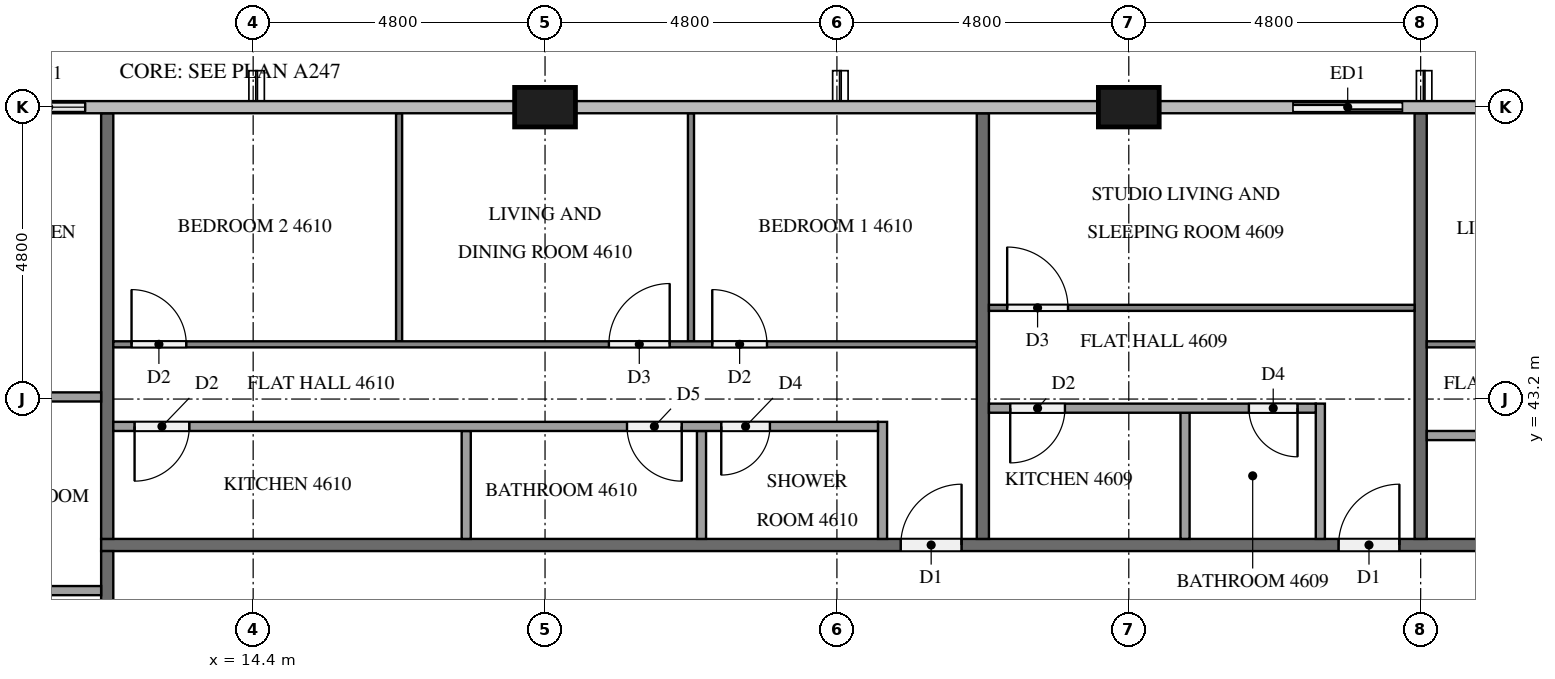
"""IFC4 building model, lengths in metres.
Left out: names, types, materials, properties, quantities, classifications, styles, units other than length and angle.
Written with IfcOpenShell. Run it as: python <this file> out.ifc"""

import sys

from ifc_helpers import new_model, si_unit, direction, frame, frame_2d, origin, origin_2d, place, context, subcontext, project, spatial, rectangle, extrude, element, fill, save


model = new_model("IFC4")
c1 = context("Model", 3, precision=1e-05, world=origin(), true_north=direction((0.0, 1.0)))
c2 = subcontext(c1, "Body", "Model", "MODEL_VIEW")
j1 = project(units=[si_unit("LENGTHUNIT", "METRE"), si_unit("PLANEANGLEUNIT", "RADIAN")], contexts=[c1])
p1 = place(None, origin())
s1 = spatial("IfcSite", under=j1, at=p1, CompositionType="ELEMENT")
p2 = place(p1, origin())
s2 = spatial("IfcBuilding", under=s1, at=p2, CompositionType="ELEMENT")
p3 = place(p2, frame((0.0, 0.0, 178.9)))
s3 = spatial("IfcBuildingStorey", under=s2, at=p3, CompositionType="ELEMENT", Elevation=178.9)
for number, where, z_axis, x_axis in (
    (1, (28.8, 48.0, 0.0), (0.0, 0.0, 1.0), (1.0, 0.0, 0.0)),
    (2, (19.2, 48.0, 0.0), (0.0, 0.0, 1.0), (1.0, 0.0, 0.0)),
):
    element("IfcColumn", number, at=place(p3, frame(where, z_axis=z_axis, x_axis=x_axis)), inside=s3, PredefinedType="COLUMN", context=c2, shape_type="SweptSolid", body=[
        extrude(rectangle(XDim=1.0, YDim=0.65, at=origin_2d()), origin(), (0.0, 0.0, 1.0), 3.2),
    ])
p4 = place(p3, frame((33.6, 48.0, 0.0), z_axis=(0.0, 0.0, 1.0), x_axis=(-1.0, 0.0, 0.0)))
e3 = element("IfcWall", 3, at=p4, inside=s3, PredefinedType="SOLIDWALL", context=c2, shape_type="SweptSolid", body=[
    extrude(rectangle(XDim=2.4, YDim=0.15, at=frame_2d((1.2, 0.0))), origin(), (0.0, 0.0, 1.0), 3.2),
])
p5 = place(p4, frame((0.3, 0.0, 0.0)))
e4 = element("IfcOpeningElement", 4, at=p5, cuts=e3, PredefinedType="OPENING", context=c2, shape_type="SweptSolid", body=[
    extrude(rectangle(XDim=1.8, YDim=2.4, at=frame_2d((0.9, 1.2))), frame((0.0, 0.085, 0.0), z_axis=(0.0, -1.0, 0.0), x_axis=(1.0, 0.0, 0.0)), (0.0, 0.0, 1.0), 0.17),
])
p6 = place(p3, frame((12.0, 48.0, 0.0), z_axis=(0.0, 0.0, 1.0), x_axis=(-1.0, 0.0, 0.0)))
e5 = element("IfcWall", 5, at=p6, inside=s3, PredefinedType="SOLIDWALL", context=c2, shape_type="SweptSolid", body=[
    extrude(rectangle(XDim=1.925, YDim=0.15, at=frame_2d((0.962, 0.0))), origin(), (0.0, 0.0, 1.0), 3.2),
])
p7 = place(p6, frame((0.363, 0.0, 0.9)))
e6 = element("IfcOpeningElement", 6, at=p7, cuts=e5, PredefinedType="OPENING", context=c2, shape_type="SweptSolid", body=[
    extrude(rectangle(XDim=1.2, YDim=1.4, at=frame_2d((0.6, 0.7))), frame((0.0, 0.085, 0.0), z_axis=(0.0, -1.0, 0.0), x_axis=(1.0, 0.0, 0.0)), (0.0, 0.0, 1.0), 0.17),
])
p8 = place(p3, frame((11.9, 40.8, 0.0), z_axis=(0.0, 0.0, 1.0), x_axis=(1.0, 0.0, 0.0)))
e7 = element("IfcWall", 7, at=p8, inside=s3, PredefinedType="PARTITIONING", context=c2, shape_type="SweptSolid", body=[
    extrude(rectangle(XDim=38.6, YDim=0.2, at=frame_2d((19.3, 0.0))), origin(), (0.0, 0.0, 1.0), 3.2),
])
p9 = place(p8, frame((37.15, 0.0, 0.0)))
e8 = element("IfcOpeningElement", 8, at=p9, cuts=e7, PredefinedType="OPENING", context=c2, shape_type="SweptSolid", body=[
    extrude(rectangle(XDim=1.0, YDim=2.1, at=frame_2d((0.5, 1.05))), frame((0.0, 0.11, 0.0), z_axis=(0.0, -1.0, 0.0), x_axis=(1.0, 0.0, 0.0)), (0.0, 0.0, 1.0), 0.22),
])
p10 = place(p8, frame((20.35, 0.0, 0.0)))
e9 = element("IfcOpeningElement", 9, at=p10, cuts=e7, PredefinedType="OPENING", context=c2, shape_type="SweptSolid", body=[
    extrude(rectangle(XDim=1.0, YDim=2.1, at=frame_2d((0.5, 1.05))), frame((0.0, 0.11, 0.0), z_axis=(0.0, -1.0, 0.0), x_axis=(1.0, 0.0, 0.0)), (0.0, 0.0, 1.0), 0.22),
])
p11 = place(p8, frame((13.15, 0.0, 0.0)))
e10 = element("IfcOpeningElement", 10, at=p11, cuts=e7, PredefinedType="OPENING", context=c2, shape_type="SweptSolid", body=[
    extrude(rectangle(XDim=1.0, YDim=2.1, at=frame_2d((0.5, 1.05))), frame((0.0, 0.11, 0.0), z_axis=(0.0, -1.0, 0.0), x_axis=(1.0, 0.0, 0.0)), (0.0, 0.0, 1.0), 0.22),
])
p12 = place(p3, frame((12.0, 12.1, 0.0), z_axis=(0.0, 0.0, 1.0), x_axis=(0.0, 1.0, 0.0)))
e11 = element("IfcWall", 11, at=p12, inside=s3, PredefinedType="PARTITIONING", context=c2, shape_type="SweptSolid", body=[
    extrude(rectangle(XDim=28.6, YDim=0.2, at=frame_2d((14.3, 0.0))), origin(), (0.0, 0.0, 1.0), 3.2),
])
p13 = place(p12, frame((26.65, 0.0, 0.0)))
e12 = element("IfcOpeningElement", 12, at=p13, cuts=e11, PredefinedType="OPENING", context=c2, shape_type="SweptSolid", body=[
    extrude(rectangle(XDim=1.0, YDim=2.1, at=frame_2d((0.5, 1.05))), frame((0.0, 0.11, 0.0), z_axis=(0.0, -1.0, 0.0), x_axis=(1.0, 0.0, 0.0)), (0.0, 0.0, 1.0), 0.22),
])
p14 = place(p12, frame((24.95, 0.0, 0.0)))
e13 = element("IfcOpeningElement", 13, at=p14, cuts=e11, PredefinedType="OPENING", context=c2, shape_type="SweptSolid", body=[
    extrude(rectangle(XDim=1.0, YDim=2.1, at=frame_2d((0.5, 1.05))), frame((0.0, 0.11, 0.0), z_axis=(0.0, -1.0, 0.0), x_axis=(1.0, 0.0, 0.0)), (0.0, 0.0, 1.0), 0.22),
])
p15 = place(p12, frame((12.95, 0.0, 0.0)))
e14 = element("IfcOpeningElement", 14, at=p15, cuts=e11, PredefinedType="OPENING", context=c2, shape_type="SweptSolid", body=[
    extrude(rectangle(XDim=1.0, YDim=2.1, at=frame_2d((0.5, 1.05))), frame((0.0, 0.11, 0.0), z_axis=(0.0, -1.0, 0.0), x_axis=(1.0, 0.0, 0.0)), (0.0, 0.0, 1.0), 0.22),
])
for number, where, z_axis, x_axis in (
    (15, (33.6, 47.9, 0.0), (0.0, 0.0, 1.0), (0.0, -1.0, 0.0)),
    (16, (26.4, 47.9, 0.0), (0.0, 0.0, 1.0), (0.0, -1.0, 0.0)),
    (17, (12.0, 47.9, 0.0), (0.0, 0.0, 1.0), (0.0, -1.0, 0.0)),
):
    element("IfcWall", number, at=place(p3, frame(where, z_axis=z_axis, x_axis=x_axis)), inside=s3, PredefinedType="PARTITIONING", context=c2, shape_type="SweptSolid", body=[
        extrude(rectangle(XDim=7.0, YDim=0.2, at=frame_2d((3.5, 0.0))), origin(), (0.0, 0.0, 1.0), 3.2),
    ])
p16 = place(p3, frame((33.7, 44.1, 0.0), z_axis=(0.0, 0.0, 1.0), x_axis=(1.0, 0.0, 0.0)))
e18 = element("IfcWall", 18, at=p16, inside=s3, PredefinedType="PARTITIONING", context=c2, shape_type="SweptSolid", body=[
    extrude(rectangle(XDim=16.6, YDim=0.1, at=frame_2d((8.3, 0.0))), origin(), (0.0, 0.0, 1.0), 3.2),
])
p17 = place(p16, frame((15.4, 0.0, 0.0)))
e19 = element("IfcOpeningElement", 19, at=p17, cuts=e18, PredefinedType="OPENING", context=c2, shape_type="SweptSolid", body=[
    extrude(rectangle(XDim=0.9, YDim=2.1, at=frame_2d((0.45, 1.05))), frame((0.0, 0.06, 0.0), z_axis=(0.0, -1.0, 0.0), x_axis=(1.0, 0.0, 0.0)), (0.0, 0.0, 1.0), 0.12),
])
p18 = place(p16, frame((7.45, 0.0, 0.0)))
e20 = element("IfcOpeningElement", 20, at=p18, cuts=e18, PredefinedType="OPENING", context=c2, shape_type="SweptSolid", body=[
    extrude(rectangle(XDim=0.9, YDim=2.1, at=frame_2d((0.45, 1.05))), frame((0.0, 0.06, 0.0), z_axis=(0.0, -1.0, 0.0), x_axis=(1.0, 0.0, 0.0)), (0.0, 0.0, 1.0), 0.12),
])
p19 = place(p16, frame((5.75, 0.0, 0.0)))
e21 = element("IfcOpeningElement", 21, at=p19, cuts=e18, PredefinedType="OPENING", context=c2, shape_type="SweptSolid", body=[
    extrude(rectangle(XDim=1.0, YDim=2.1, at=frame_2d((0.5, 1.05))), frame((0.0, 0.06, 0.0), z_axis=(0.0, -1.0, 0.0), x_axis=(1.0, 0.0, 0.0)), (0.0, 0.0, 1.0), 0.12),
])
p20 = place(p3, frame((48.675, 42.6, 0.0), z_axis=(0.0, 0.0, 1.0), x_axis=(-1.0, 0.0, 0.0)))
e22 = element("IfcWall", 22, at=p20, inside=s3, PredefinedType="PARTITIONING", context=c2, shape_type="SweptSolid", body=[
    extrude(rectangle(XDim=14.975, YDim=0.15, at=frame_2d((7.488, 0.0))), origin(), (0.0, 0.0, 1.0), 3.2),
])
p21 = place(p20, frame((0.3, 0.0, 0.0)))
e23 = element("IfcOpeningElement", 23, at=p21, cuts=e22, PredefinedType="OPENING", context=c2, shape_type="SweptSolid", body=[
    extrude(rectangle(XDim=0.8, YDim=2.1, at=frame_2d((0.4, 1.05))), frame((0.0, 0.085, 0.0), z_axis=(0.0, -1.0, 0.0), x_axis=(1.0, 0.0, 0.0)), (0.0, 0.0, 1.0), 0.17),
])
p22 = place(p20, frame((6.838, 0.0, 0.0)))
e24 = element("IfcOpeningElement", 24, at=p22, cuts=e22, PredefinedType="OPENING", context=c2, shape_type="SweptSolid", body=[
    extrude(rectangle(XDim=0.9, YDim=2.1, at=frame_2d((0.45, 1.05))), frame((0.0, 0.085, 0.0), z_axis=(0.0, -1.0, 0.0), x_axis=(1.0, 0.0, 0.0)), (0.0, 0.0, 1.0), 0.17),
])
p23 = place(p20, frame((8.388, 0.0, 0.0)))
e25 = element("IfcOpeningElement", 25, at=p23, cuts=e22, PredefinedType="OPENING", context=c2, shape_type="SweptSolid", body=[
    extrude(rectangle(XDim=0.9, YDim=2.1, at=frame_2d((0.45, 1.05))), frame((0.0, 0.085, 0.0), z_axis=(0.0, -1.0, 0.0), x_axis=(1.0, 0.0, 0.0)), (0.0, 0.0, 1.0), 0.17),
])
p24 = place(p3, frame((26.5, 44.7, 0.0), z_axis=(0.0, 0.0, 1.0), x_axis=(1.0, 0.0, 0.0)))
e26 = element("IfcWall", 26, at=p24, inside=s3, PredefinedType="PARTITIONING", context=c2, shape_type="SweptSolid", body=[
    extrude(rectangle(XDim=7.0, YDim=0.1, at=frame_2d((3.5, 0.0))), origin(), (0.0, 0.0, 1.0), 3.2),
])
p25 = place(p24, frame((0.3, 0.0, 0.0)))
e27 = element("IfcOpeningElement", 27, at=p25, cuts=e26, PredefinedType="OPENING", context=c2, shape_type="SweptSolid", body=[
    extrude(rectangle(XDim=1.0, YDim=2.1, at=frame_2d((0.5, 1.05))), frame((0.0, 0.06, 0.0), z_axis=(0.0, -1.0, 0.0), x_axis=(1.0, 0.0, 0.0)), (0.0, 0.0, 1.0), 0.12),
])
p26 = place(p3, frame((29.725, 40.9, 0.0), z_axis=(0.0, 0.0, 1.0), x_axis=(0.0, 1.0, 0.0)))
e28 = element("IfcWall", 28, at=p26, inside=s3, PredefinedType="PARTITIONING", context=c2, shape_type="SweptSolid", body=[
    extrude(rectangle(XDim=2.075, YDim=0.15, at=frame_2d((1.038, 0.0))), origin(), (0.0, 0.0, 1.0), 3.2),
])
p27 = place(p3, frame((31.95, 40.9, 0.0), z_axis=(0.0, 0.0, 1.0), x_axis=(0.0, 1.0, 0.0)))
e29 = element("IfcWall", 29, at=p27, inside=s3, PredefinedType="PARTITIONING", context=c2, shape_type="SweptSolid", body=[
    extrude(rectangle(XDim=2.225, YDim=0.15, at=frame_2d((1.113, 0.0))), origin(), (0.0, 0.0, 1.0), 3.2),
])
p28 = place(p3, frame((31.875, 43.05, 0.0), z_axis=(0.0, 0.0, 1.0), x_axis=(-1.0, 0.0, 0.0)))
e30 = element("IfcWall", 30, at=p28, inside=s3, PredefinedType="PARTITIONING", context=c2, shape_type="SweptSolid", body=[
    extrude(rectangle(XDim=5.375, YDim=0.15, at=frame_2d((2.688, 0.0))), origin(), (0.0, 0.0, 1.0), 3.2),
])
p29 = place(p28, frame((0.3, 0.0, 0.0)))
e31 = element("IfcOpeningElement", 31, at=p29, cuts=e30, PredefinedType="OPENING", context=c2, shape_type="SweptSolid", body=[
    extrude(rectangle(XDim=0.8, YDim=2.1, at=frame_2d((0.4, 1.05))), frame((0.0, 0.085, 0.0), z_axis=(0.0, -1.0, 0.0), x_axis=(1.0, 0.0, 0.0)), (0.0, 0.0, 1.0), 0.17),
])
p30 = place(p28, frame((4.125, 0.0, 0.0)))
e32 = element("IfcOpeningElement", 32, at=p30, cuts=e30, PredefinedType="OPENING", context=c2, shape_type="SweptSolid", body=[
    extrude(rectangle(XDim=0.9, YDim=2.1, at=frame_2d((0.45, 1.05))), frame((0.0, 0.085, 0.0), z_axis=(0.0, -1.0, 0.0), x_axis=(1.0, 0.0, 0.0)), (0.0, 0.0, 1.0), 0.17),
])
for number, where, z_axis, x_axis in (
    (33, (21.6, 44.15, 0.0), (0.0, 0.0, 1.0), (0.0, 1.0, 0.0)),
    (34, (16.8, 44.15, 0.0), (0.0, 0.0, 1.0), (0.0, 1.0, 0.0)),
):
    element("IfcWall", number, at=place(p3, frame(where, z_axis=z_axis, x_axis=x_axis)), inside=s3, PredefinedType="PARTITIONING", context=c2, shape_type="SweptSolid", body=[
        extrude(rectangle(XDim=3.75, YDim=0.1, at=frame_2d((1.875, 0.0))), origin(), (0.0, 0.0, 1.0), 3.2),
    ])
p31 = place(p3, frame((12.1, 44.1, 0.0), z_axis=(0.0, 0.0, 1.0), x_axis=(1.0, 0.0, 0.0)))
e35 = element("IfcWall", 35, at=p31, inside=s3, PredefinedType="PARTITIONING", context=c2, shape_type="SweptSolid", body=[
    extrude(rectangle(XDim=14.2, YDim=0.1, at=frame_2d((7.1, 0.0))), origin(), (0.0, 0.0, 1.0), 3.2),
])
p32 = place(p31, frame((9.85, 0.0, 0.0)))
e36 = element("IfcOpeningElement", 36, at=p32, cuts=e35, PredefinedType="OPENING", context=c2, shape_type="SweptSolid", body=[
    extrude(rectangle(XDim=0.9, YDim=2.1, at=frame_2d((0.45, 1.05))), frame((0.0, 0.06, 0.0), z_axis=(0.0, -1.0, 0.0), x_axis=(1.0, 0.0, 0.0)), (0.0, 0.0, 1.0), 0.12),
])
p33 = place(p31, frame((8.15, 0.0, 0.0)))
e37 = element("IfcOpeningElement", 37, at=p33, cuts=e35, PredefinedType="OPENING", context=c2, shape_type="SweptSolid", body=[
    extrude(rectangle(XDim=1.0, YDim=2.1, at=frame_2d((0.5, 1.05))), frame((0.0, 0.06, 0.0), z_axis=(0.0, -1.0, 0.0), x_axis=(1.0, 0.0, 0.0)), (0.0, 0.0, 1.0), 0.12),
])
p34 = place(p31, frame((0.3, 0.0, 0.0)))
e38 = element("IfcOpeningElement", 38, at=p34, cuts=e35, PredefinedType="OPENING", context=c2, shape_type="SweptSolid", body=[
    extrude(rectangle(XDim=0.9, YDim=2.1, at=frame_2d((0.45, 1.05))), frame((0.0, 0.06, 0.0), z_axis=(0.0, -1.0, 0.0), x_axis=(1.0, 0.0, 0.0)), (0.0, 0.0, 1.0), 0.12),
])
for number, where, z_axis, x_axis in (
    (39, (21.773, 40.9, 0.0), (0.0, 0.0, 1.0), (0.0, 1.0, 0.0)),
    (40, (17.904, 40.9, 0.0), (0.0, 0.0, 1.0), (0.0, 1.0, 0.0)),
):
    element("IfcWall", number, at=place(p3, frame(where, z_axis=z_axis, x_axis=x_axis)), inside=s3, PredefinedType="PARTITIONING", context=c2, shape_type="SweptSolid", body=[
        extrude(rectangle(XDim=1.775, YDim=0.15, at=frame_2d((0.888, 0.0))), origin(), (0.0, 0.0, 1.0), 3.2),
    ])
p35 = place(p3, frame((24.75, 40.9, 0.0), z_axis=(0.0, 0.0, 1.0), x_axis=(0.0, 1.0, 0.0)))
e41 = element("IfcWall", 41, at=p35, inside=s3, PredefinedType="PARTITIONING", context=c2, shape_type="SweptSolid", body=[
    extrude(rectangle(XDim=1.925, YDim=0.15, at=frame_2d((0.962, 0.0))), origin(), (0.0, 0.0, 1.0), 3.2),
])
p36 = place(p3, frame((24.675, 42.75, 0.0), z_axis=(0.0, 0.0, 1.0), x_axis=(-1.0, 0.0, 0.0)))
e42 = element("IfcWall", 42, at=p36, inside=s3, PredefinedType="PARTITIONING", context=c2, shape_type="SweptSolid", body=[
    extrude(rectangle(XDim=12.575, YDim=0.15, at=frame_2d((6.288, 0.0))), origin(), (0.0, 0.0, 1.0), 3.2),
])
p37 = place(p36, frame((1.777, 0.0, 0.0)))
e43 = element("IfcOpeningElement", 43, at=p37, cuts=e42, PredefinedType="OPENING", context=c2, shape_type="SweptSolid", body=[
    extrude(rectangle(XDim=0.8, YDim=2.1, at=frame_2d((0.4, 1.05))), frame((0.0, 0.085, 0.0), z_axis=(0.0, -1.0, 0.0), x_axis=(1.0, 0.0, 0.0)), (0.0, 0.0, 1.0), 0.17),
])
p38 = place(p36, frame((3.227, 0.0, 0.0)))
e44 = element("IfcOpeningElement", 44, at=p38, cuts=e42, PredefinedType="OPENING", context=c2, shape_type="SweptSolid", body=[
    extrude(rectangle(XDim=0.9, YDim=2.1, at=frame_2d((0.45, 1.05))), frame((0.0, 0.085, 0.0), z_axis=(0.0, -1.0, 0.0), x_axis=(1.0, 0.0, 0.0)), (0.0, 0.0, 1.0), 0.17),
])
p39 = place(p36, frame((11.325, 0.0, 0.0)))
e45 = element("IfcOpeningElement", 45, at=p39, cuts=e42, PredefinedType="OPENING", context=c2, shape_type="SweptSolid", body=[
    extrude(rectangle(XDim=0.9, YDim=2.1, at=frame_2d((0.45, 1.05))), frame((0.0, 0.085, 0.0), z_axis=(0.0, -1.0, 0.0), x_axis=(1.0, 0.0, 0.0)), (0.0, 0.0, 1.0), 0.17),
])
p40 = place(p3, frame((11.9, 43.235, 0.0), z_axis=(0.0, 0.0, 1.0), x_axis=(-1.0, 0.0, 0.0)))
e46 = element("IfcWall", 46, at=p40, inside=s3, PredefinedType="PARTITIONING", context=c2, shape_type="SweptSolid", body=[
    extrude(rectangle(XDim=2.225, YDim=0.15, at=frame_2d((1.112, 0.0))), origin(), (0.0, 0.0, 1.0), 3.2),
])
p41 = place(p3, frame((11.9, 40.05, 0.0), z_axis=(0.0, 0.0, 1.0), x_axis=(-1.0, 0.0, 0.0)))
e47 = element("IfcWall", 47, at=p41, inside=s3, PredefinedType="PARTITIONING", context=c2, shape_type="SweptSolid", body=[
    extrude(rectangle(XDim=2.375, YDim=0.15, at=frame_2d((1.188, 0.0))), origin(), (0.0, 0.0, 1.0), 3.2),
])
p42 = place(p5, origin())
e48 = element("IfcDoor", 48, at=p42, inside=s3, OperationType="SLIDING_TO_LEFT", PredefinedType="DOOR", context=c2, shape_type="SweptSolid", body=[
    extrude(rectangle(XDim=1.8, YDim=2.4, at=frame_2d((0.9, 1.2))), frame((0.0, 0.025, 0.0), z_axis=(0.0, -1.0, 0.0), x_axis=(1.0, 0.0, 0.0)), (0.0, 0.0, 1.0), 0.05),
])
fill(e4, e48)
p43 = place(p7, origin())
e49 = element("IfcWindow", 49, at=p43, inside=s3, PartitioningType="SINGLE_PANEL", PredefinedType="WINDOW", context=c2, shape_type="SweptSolid", body=[
    extrude(rectangle(XDim=1.2, YDim=1.4, at=frame_2d((0.6, 0.7))), frame((0.0, 0.03, 0.0), z_axis=(0.0, -1.0, 0.0), x_axis=(1.0, 0.0, 0.0)), (0.0, 0.0, 1.0), 0.06),
])
fill(e6, e49)
p44 = place(p10, origin())
e50 = element("IfcDoor", 50, at=p44, inside=s3, OperationType="SINGLE_SWING_RIGHT", PredefinedType="DOOR", context=c2, shape_type="SweptSolid", body=[
    extrude(rectangle(XDim=1.0, YDim=2.1, at=frame_2d((0.5, 1.05))), frame((0.0, 0.025, 0.0), z_axis=(0.0, -1.0, 0.0), x_axis=(1.0, 0.0, 0.0)), (0.0, 0.0, 1.0), 0.05),
])
fill(e9, e50)
p45 = place(p11, origin())
e51 = element("IfcDoor", 51, at=p45, inside=s3, OperationType="SINGLE_SWING_RIGHT", PredefinedType="DOOR", context=c2, shape_type="SweptSolid", body=[
    extrude(rectangle(XDim=1.0, YDim=2.1, at=frame_2d((0.5, 1.05))), frame((0.0, 0.025, 0.0), z_axis=(0.0, -1.0, 0.0), x_axis=(1.0, 0.0, 0.0)), (0.0, 0.0, 1.0), 0.05),
])
fill(e10, e51)
p46 = place(p25, origin())
e52 = element("IfcDoor", 52, at=p46, inside=s3, OperationType="SINGLE_SWING_LEFT", PredefinedType="DOOR", context=c2, shape_type="SweptSolid", body=[
    extrude(rectangle(XDim=1.0, YDim=2.1, at=frame_2d((0.5, 1.05))), frame((0.0, 0.025, 0.0), z_axis=(0.0, -1.0, 0.0), x_axis=(1.0, 0.0, 0.0)), (0.0, 0.0, 1.0), 0.05),
])
fill(e27, e52)
p47 = place(p29, origin())
e53 = element("IfcDoor", 53, at=p47, inside=s3, OperationType="SINGLE_SWING_LEFT", PredefinedType="DOOR", context=c2, shape_type="SweptSolid", body=[
    extrude(rectangle(XDim=0.8, YDim=2.1, at=frame_2d((0.4, 1.05))), frame((0.0, 0.025, 0.0), z_axis=(0.0, -1.0, 0.0), x_axis=(1.0, 0.0, 0.0)), (0.0, 0.0, 1.0), 0.05),
])
fill(e31, e53)
p48 = place(p30, origin())
e54 = element("IfcDoor", 54, at=p48, inside=s3, OperationType="SINGLE_SWING_RIGHT", PredefinedType="DOOR", context=c2, shape_type="SweptSolid", body=[
    extrude(rectangle(XDim=0.9, YDim=2.1, at=frame_2d((0.45, 1.05))), frame((0.0, 0.025, 0.0), z_axis=(0.0, -1.0, 0.0), x_axis=(1.0, 0.0, 0.0)), (0.0, 0.0, 1.0), 0.05),
])
fill(e32, e54)
p49 = place(p32, origin())
e55 = element("IfcDoor", 55, at=p49, inside=s3, OperationType="SINGLE_SWING_LEFT", PredefinedType="DOOR", context=c2, shape_type="SweptSolid", body=[
    extrude(rectangle(XDim=0.9, YDim=2.1, at=frame_2d((0.45, 1.05))), frame((0.0, 0.025, 0.0), z_axis=(0.0, -1.0, 0.0), x_axis=(1.0, 0.0, 0.0)), (0.0, 0.0, 1.0), 0.05),
])
fill(e36, e55)
p50 = place(p33, origin())
e56 = element("IfcDoor", 56, at=p50, inside=s3, OperationType="SINGLE_SWING_RIGHT", PredefinedType="DOOR", context=c2, shape_type="SweptSolid", body=[
    extrude(rectangle(XDim=1.0, YDim=2.1, at=frame_2d((0.5, 1.05))), frame((0.0, 0.025, 0.0), z_axis=(0.0, -1.0, 0.0), x_axis=(1.0, 0.0, 0.0)), (0.0, 0.0, 1.0), 0.05),
])
fill(e37, e56)
p51 = place(p34, origin())
e57 = element("IfcDoor", 57, at=p51, inside=s3, OperationType="SINGLE_SWING_LEFT", PredefinedType="DOOR", context=c2, shape_type="SweptSolid", body=[
    extrude(rectangle(XDim=0.9, YDim=2.1, at=frame_2d((0.45, 1.05))), frame((0.0, 0.025, 0.0), z_axis=(0.0, -1.0, 0.0), x_axis=(1.0, 0.0, 0.0)), (0.0, 0.0, 1.0), 0.05),
])
fill(e38, e57)
p52 = place(p37, origin())
e58 = element("IfcDoor", 58, at=p52, inside=s3, OperationType="SINGLE_SWING_RIGHT", PredefinedType="DOOR", context=c2, shape_type="SweptSolid", body=[
    extrude(rectangle(XDim=0.8, YDim=2.1, at=frame_2d((0.4, 1.05))), frame((0.0, 0.025, 0.0), z_axis=(0.0, -1.0, 0.0), x_axis=(1.0, 0.0, 0.0)), (0.0, 0.0, 1.0), 0.05),
])
fill(e43, e58)
p53 = place(p38, origin())
e59 = element("IfcDoor", 59, at=p53, inside=s3, OperationType="SINGLE_SWING_LEFT", PredefinedType="DOOR", context=c2, shape_type="SweptSolid", body=[
    extrude(rectangle(XDim=0.9, YDim=2.1, at=frame_2d((0.45, 1.05))), frame((0.0, 0.025, 0.0), z_axis=(0.0, -1.0, 0.0), x_axis=(1.0, 0.0, 0.0)), (0.0, 0.0, 1.0), 0.05),
])
fill(e44, e59)
p54 = place(p39, origin())
e60 = element("IfcDoor", 60, at=p54, inside=s3, OperationType="SINGLE_SWING_RIGHT", PredefinedType="DOOR", context=c2, shape_type="SweptSolid", body=[
    extrude(rectangle(XDim=0.9, YDim=2.1, at=frame_2d((0.45, 1.05))), frame((0.0, 0.025, 0.0), z_axis=(0.0, -1.0, 0.0), x_axis=(1.0, 0.0, 0.0)), (0.0, 0.0, 1.0), 0.05),
])
fill(e45, e60)
save(model, sys.argv[1])
